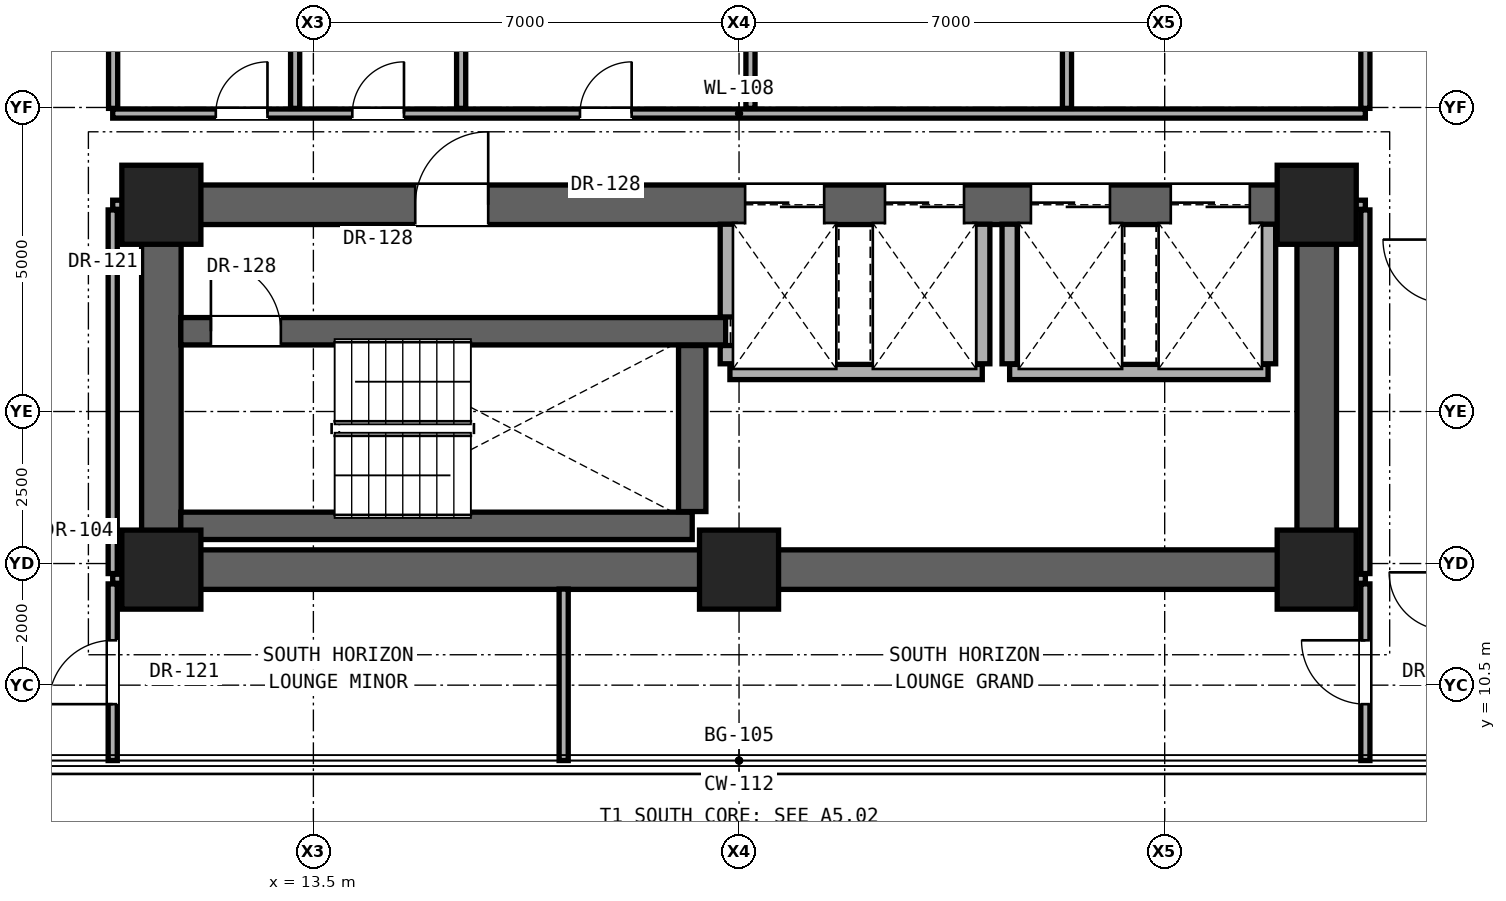
"""IFC4 building model, lengths in metres.
Left out: names, types, materials, properties, quantities, classifications, styles, units other than length and angle.
Written with IfcOpenShell. Run it as: python <this file> out.ifc"""

import sys

from ifc_helpers import new_model, si_unit, direction, frame, frame_2d, origin, origin_2d, place, context, subcontext, project, spatial, rectangle, extrude, element, fill, save


model = new_model("IFC4")
c1 = context("Model", 3, precision=1e-05, world=origin(), true_north=direction((0.0, 1.0)))
c2 = subcontext(c1, "Body", "Model", "MODEL_VIEW")
j1 = project(units=[si_unit("LENGTHUNIT", "METRE"), si_unit("PLANEANGLEUNIT", "RADIAN")], contexts=[c1])
p1 = place(None, origin())
s1 = spatial("IfcSite", under=j1, at=p1, CompositionType="ELEMENT")
p2 = place(p1, origin())
s2 = spatial("IfcBuilding", under=s1, at=p2, CompositionType="ELEMENT")
p3 = place(p2, frame((0.0, 0.0, 52.1)))
s3 = spatial("IfcBuildingStorey", under=s2, at=p3, CompositionType="ELEMENT", Elevation=52.1)
for number, where, z_axis, x_axis in (
    (1, (11.0, 12.4, 0.0), (0.0, 0.0, 1.0), (1.0, 0.0, 0.0)),
    (2, (20.5, 12.4, 0.0), (0.0, 0.0, 1.0), (1.0, 0.0, 0.0)),
    (3, (30.0, 12.4, 0.0), (0.0, 0.0, 1.0), (1.0, 0.0, 0.0)),
    (4, (11.0, 18.4, 0.0), (0.0, 0.0, 1.0), (1.0, 0.0, 0.0)),
    (5, (30.0, 18.4, 0.0), (0.0, 0.0, 1.0), (1.0, 0.0, 0.0)),
):
    element("IfcColumn", number, at=place(p3, frame(where, z_axis=z_axis, x_axis=x_axis)), inside=s3, PredefinedType="COLUMN", context=c2, shape_type="SweptSolid", body=[
        extrude(rectangle(XDim=1.3, YDim=1.3, at=origin_2d()), origin(), (0.0, 0.0, 1.0), 3.3),
    ])
p4 = place(p3, frame((11.0, 12.4, 0.0), z_axis=(0.0, 0.0, 1.0), x_axis=(1.0, 0.0, 0.0)))
e6 = element("IfcWall", 6, at=p4, inside=s3, PredefinedType="SHEAR", context=c2, shape_type="SweptSolid", body=[
    extrude(rectangle(XDim=19.0, YDim=0.65, at=frame_2d((9.5, 0.0))), origin(), (0.0, 0.0, 1.0), 3.06),
])
for number, where, z_axis, x_axis in (
    (7, (11.0, 12.4, 0.0), (0.0, 0.0, 1.0), (0.0, 1.0, 0.0)),
    (8, (30.0, 12.4, 0.0), (0.0, 0.0, 1.0), (0.0, 1.0, 0.0)),
):
    element("IfcWall", number, at=place(p3, frame(where, z_axis=z_axis, x_axis=x_axis)), inside=s3, PredefinedType="SHEAR", context=c2, shape_type="SweptSolid", body=[
        extrude(rectangle(XDim=6.0, YDim=0.65, at=frame_2d((3.0, 0.0))), origin(), (0.0, 0.0, 1.0), 3.06),
    ])
p5 = place(p3, frame((11.0, 18.4, 0.0), z_axis=(0.0, 0.0, 1.0), x_axis=(1.0, 0.0, 0.0)))
e9 = element("IfcWall", 9, at=p5, inside=s3, PredefinedType="SHEAR", context=c2, shape_type="SweptSolid", body=[
    extrude(rectangle(XDim=19.0, YDim=0.65, at=frame_2d((9.5, 0.0))), origin(), (0.0, 0.0, 1.0), 3.06),
])
p6 = place(p5, frame((4.175, 0.0, 0.0)))
e10 = element("IfcOpeningElement", 10, at=p6, cuts=e9, PredefinedType="OPENING", context=c2, shape_type="SweptSolid", body=[
    extrude(rectangle(XDim=1.2, YDim=2.25, at=frame_2d((0.6, 1.125))), frame((0.0, 0.335, 0.0), z_axis=(0.0, -1.0, 0.0), x_axis=(1.0, 0.0, 0.0)), (0.0, 0.0, 1.0), 0.67),
])
p7 = place(p5, frame((9.6, 0.0, 0.0)))
e11 = element("IfcOpeningElement", 11, at=p7, cuts=e9, PredefinedType="OPENING", context=c2, shape_type="SweptSolid", body=[
    extrude(rectangle(XDim=1.3, YDim=2.3, at=frame_2d((0.65, 1.15))), frame((0.0, 0.335, 0.0), z_axis=(0.0, -1.0, 0.0), x_axis=(1.0, 0.0, 0.0)), (0.0, 0.0, 1.0), 0.67),
])
p8 = place(p5, frame((11.9, 0.0, 0.0)))
e12 = element("IfcOpeningElement", 12, at=p8, cuts=e9, PredefinedType="OPENING", context=c2, shape_type="SweptSolid", body=[
    extrude(rectangle(XDim=1.3, YDim=2.3, at=frame_2d((0.65, 1.15))), frame((0.0, 0.335, 0.0), z_axis=(0.0, -1.0, 0.0), x_axis=(1.0, 0.0, 0.0)), (0.0, 0.0, 1.0), 0.67),
])
p9 = place(p5, frame((14.3, 0.0, 0.0)))
e13 = element("IfcOpeningElement", 13, at=p9, cuts=e9, PredefinedType="OPENING", context=c2, shape_type="SweptSolid", body=[
    extrude(rectangle(XDim=1.3, YDim=2.3, at=frame_2d((0.65, 1.15))), frame((0.0, 0.335, 0.0), z_axis=(0.0, -1.0, 0.0), x_axis=(1.0, 0.0, 0.0)), (0.0, 0.0, 1.0), 0.67),
])
p10 = place(p5, frame((16.6, 0.0, 0.0)))
e14 = element("IfcOpeningElement", 14, at=p10, cuts=e9, PredefinedType="OPENING", context=c2, shape_type="SweptSolid", body=[
    extrude(rectangle(XDim=1.3, YDim=2.3, at=frame_2d((0.65, 1.15))), frame((0.0, 0.335, 0.0), z_axis=(0.0, -1.0, 0.0), x_axis=(1.0, 0.0, 0.0)), (0.0, 0.0, 1.0), 0.67),
])
for number, where, z_axis, x_axis in (
    (15, (10.2, 12.25, 0.0), (0.0, 0.0, 1.0), (1.0, 0.0, 0.0)),
    (16, (30.32, 12.25, 0.0), (0.0, 0.0, 1.0), (1.0, 0.0, 0.0)),
):
    element("IfcWall", number, at=place(p3, frame(where, z_axis=z_axis, x_axis=x_axis)), inside=s3, PredefinedType="PARTITIONING", context=c2, shape_type="SweptSolid", body=[
        extrude(rectangle(XDim=0.48, YDim=0.15, at=frame_2d((0.24, 0.0))), origin(), (0.0, 0.0, 1.0), 3.06),
    ])
p11 = place(p3, frame((11.32, 13.12, 0.0), z_axis=(0.0, 0.0, 1.0), x_axis=(1.0, 0.0, 0.0)))
e17 = element("IfcWall", 17, at=p11, inside=s3, PredefinedType="SHEAR", context=c2, shape_type="SweptSolid", body=[
    extrude(rectangle(XDim=8.41, YDim=0.45, at=frame_2d((4.205, 0.0))), origin(), (0.0, 0.0, 1.0), 3.06),
])
p12 = place(p3, frame((20.35, 15.65, 0.0), z_axis=(0.0, 0.0, 1.0), x_axis=(1.0, 0.0, 0.0)))
e18 = element("IfcWall", 18, at=p12, inside=s3, PredefinedType="SOLIDWALL", context=c2, shape_type="SweptSolid", body=[
    extrude(rectangle(XDim=4.15, YDim=0.25, at=frame_2d((2.075, 0.0))), origin(), (0.0, 0.0, 1.0), 3.06),
])
p13 = place(p3, frame((24.95, 15.65, 0.0), z_axis=(0.0, 0.0, 1.0), x_axis=(1.0, 0.0, 0.0)))
e19 = element("IfcWall", 19, at=p13, inside=s3, PredefinedType="SOLIDWALL", context=c2, shape_type="SweptSolid", body=[
    extrude(rectangle(XDim=4.25, YDim=0.25, at=frame_2d((2.125, 0.0))), origin(), (0.0, 0.0, 1.0), 3.06),
])
p14 = place(p3, frame((11.32, 16.32, 0.0), z_axis=(0.0, 0.0, 1.0), x_axis=(1.0, 0.0, 0.0)))
e20 = element("IfcWall", 20, at=p14, inside=s3, PredefinedType="SHEAR", context=c2, shape_type="SweptSolid", body=[
    extrude(rectangle(XDim=8.96, YDim=0.45, at=frame_2d((4.48, 0.0))), origin(), (0.0, 0.0, 1.0), 3.06),
])
p15 = place(p14, frame((0.495, 0.0, 0.0)))
e21 = element("IfcOpeningElement", 21, at=p15, cuts=e20, PredefinedType="OPENING", context=c2, shape_type="SweptSolid", body=[
    extrude(rectangle(XDim=1.15, YDim=2.2, at=frame_2d((0.575, 1.1))), frame((0.0, 0.235, 0.0), z_axis=(0.0, -1.0, 0.0), x_axis=(1.0, 0.0, 0.0)), (0.0, 0.0, 1.0), 0.47),
])
for number, where, z_axis, x_axis in (
    (22, (10.2, 18.4, 0.0), (0.0, 0.0, 1.0), (1.0, 0.0, 0.0)),
    (23, (30.32, 18.4, 0.0), (0.0, 0.0, 1.0), (1.0, 0.0, 0.0)),
):
    element("IfcWall", number, at=place(p3, frame(where, z_axis=z_axis, x_axis=x_axis)), inside=s3, PredefinedType="PARTITIONING", context=c2, shape_type="SweptSolid", body=[
        extrude(rectangle(XDim=0.48, YDim=0.15, at=frame_2d((0.24, 0.0))), origin(), (0.0, 0.0, 1.0), 2.436),
    ])
p16 = place(p3, frame((10.2, 19.9, 0.0), z_axis=(0.0, 0.0, 1.0), x_axis=(1.0, 0.0, 0.0)))
e24 = element("IfcWall", 24, at=p16, inside=s3, PredefinedType="PARTITIONING", context=c2, shape_type="SweptSolid", body=[
    extrude(rectangle(XDim=20.6, YDim=0.15, at=frame_2d((10.3, 0.0))), origin(), (0.0, 0.0, 1.0), 2.104),
])
p17 = place(p16, frame((1.695, 0.0, 0.0)))
e25 = element("IfcOpeningElement", 25, at=p17, cuts=e24, PredefinedType="OPENING", context=c2, shape_type="SweptSolid", body=[
    extrude(rectangle(XDim=0.85, YDim=2.01, at=frame_2d((0.425, 1.005))), frame((0.0, 0.085, 0.0), z_axis=(0.0, -1.0, 0.0), x_axis=(1.0, 0.0, 0.0)), (0.0, 0.0, 1.0), 0.17),
])
p18 = place(p16, frame((3.94, 0.0, 0.0)))
e26 = element("IfcOpeningElement", 26, at=p18, cuts=e24, PredefinedType="OPENING", context=c2, shape_type="SweptSolid", body=[
    extrude(rectangle(XDim=0.85, YDim=2.01, at=frame_2d((0.425, 1.005))), frame((0.0, 0.085, 0.0), z_axis=(0.0, -1.0, 0.0), x_axis=(1.0, 0.0, 0.0)), (0.0, 0.0, 1.0), 0.17),
])
p19 = place(p16, frame((7.684, 0.0, 0.0)))
e27 = element("IfcOpeningElement", 27, at=p19, cuts=e24, PredefinedType="OPENING", context=c2, shape_type="SweptSolid", body=[
    extrude(rectangle(XDim=0.85, YDim=2.01, at=frame_2d((0.425, 1.005))), frame((0.0, 0.085, 0.0), z_axis=(0.0, -1.0, 0.0), x_axis=(1.0, 0.0, 0.0)), (0.0, 0.0, 1.0), 0.17),
])
p20 = place(p3, frame((10.2, 9.26, 0.0), z_axis=(0.0, 0.0, 1.0), x_axis=(0.0, 1.0, 0.0)))
e28 = element("IfcWall", 28, at=p20, inside=s3, PredefinedType="PARTITIONING", context=c2, shape_type="SweptSolid", body=[
    extrude(rectangle(XDim=2.905, YDim=0.15, at=frame_2d((1.453, 0.0))), origin(), (0.0, 0.0, 1.0), 3.06),
])
p21 = place(p20, frame((0.927, 0.0, 0.0)))
e29 = element("IfcOpeningElement", 29, at=p21, cuts=e28, PredefinedType="OPENING", context=c2, shape_type="SweptSolid", body=[
    extrude(rectangle(XDim=1.05, YDim=2.2, at=frame_2d((0.525, 1.1))), frame((0.0, 0.085, 0.0), z_axis=(0.0, -1.0, 0.0), x_axis=(1.0, 0.0, 0.0)), (0.0, 0.0, 1.0), 0.17),
])
p22 = place(p3, frame((10.2, 12.335, 0.0), z_axis=(0.0, 0.0, 1.0), x_axis=(0.0, 1.0, 0.0)))
e30 = element("IfcWall", 30, at=p22, inside=s3, PredefinedType="PARTITIONING", context=c2, shape_type="SweptSolid", body=[
    extrude(rectangle(XDim=5.98, YDim=0.15, at=frame_2d((2.99, 0.0))), origin(), (0.0, 0.0, 1.0), 2.436),
])
for number, where, z_axis, x_axis in (
    (31, (10.207, 19.985, 0.0), (0.0, 0.0, 1.0), (0.0, 1.0, 0.0)),
    (32, (13.2, 19.985, 0.0), (0.0, 0.0, 1.0), (0.0, 1.0, 0.0)),
):
    element("IfcWall", number, at=place(p3, frame(where, z_axis=z_axis, x_axis=x_axis)), inside=s3, PredefinedType="PARTITIONING", context=c2, shape_type="SweptSolid", body=[
        extrude(rectangle(XDim=2.78, YDim=0.15, at=frame_2d((1.39, 0.0))), origin(), (0.0, 0.0, 1.0), 3.06),
    ])
p23 = place(p3, frame((15.93, 19.985, 0.0), z_axis=(0.0, 0.0, 1.0), x_axis=(0.0, 1.0, 0.0)))
e33 = element("IfcWall", 33, at=p23, inside=s3, PredefinedType="PARTITIONING", context=c2, shape_type="SweptSolid", body=[
    extrude(rectangle(XDim=2.78, YDim=0.15, at=frame_2d((1.39, 0.0))), origin(), (0.0, 0.0, 1.0), 2.589),
])
p24 = place(p3, frame((17.616, 9.26, 0.0), z_axis=(0.0, 0.0, 1.0), x_axis=(0.0, 1.0, 0.0)))
e34 = element("IfcWall", 34, at=p24, inside=s3, PredefinedType="PARTITIONING", context=c2, shape_type="SweptSolid", body=[
    extrude(rectangle(XDim=2.82, YDim=0.15, at=frame_2d((1.41, 0.0))), origin(), (0.0, 0.0, 1.0), 3.06),
])
p25 = place(p3, frame((19.73, 13.355, 0.0), z_axis=(0.0, 0.0, 1.0), x_axis=(0.0, 1.0, 0.0)))
e35 = element("IfcWall", 35, at=p25, inside=s3, PredefinedType="SHEAR", context=c2, shape_type="SweptSolid", body=[
    extrude(rectangle(XDim=2.73, YDim=0.45, at=frame_2d((1.365, 0.0))), origin(), (0.0, 0.0, 1.0), 3.06),
])
p26 = place(p3, frame((20.315, 15.785, 0.0), z_axis=(0.0, 0.0, 1.0), x_axis=(0.0, 1.0, 0.0)))
e36 = element("IfcWall", 36, at=p26, inside=s3, PredefinedType="SOLIDWALL", context=c2, shape_type="SweptSolid", body=[
    extrude(rectangle(XDim=0.3, YDim=0.25, at=frame_2d((0.15, 0.0))), origin(), (0.0, 0.0, 1.0), 3.06),
])
p27 = place(p3, frame((20.315, 16.555, 0.0), z_axis=(0.0, 0.0, 1.0), x_axis=(0.0, 1.0, 0.0)))
e37 = element("IfcWall", 37, at=p27, inside=s3, PredefinedType="SOLIDWALL", context=c2, shape_type="SweptSolid", body=[
    extrude(rectangle(XDim=1.525, YDim=0.25, at=frame_2d((0.763, 0.0))), origin(), (0.0, 0.0, 1.0), 3.06),
])
p28 = place(p3, frame((20.688, 19.985, 0.0), z_axis=(0.0, 0.0, 1.0), x_axis=(0.0, 1.0, 0.0)))
e38 = element("IfcWall", 38, at=p28, inside=s3, PredefinedType="PARTITIONING", context=c2, shape_type="SweptSolid", body=[
    extrude(rectangle(XDim=13.03, YDim=0.15, at=frame_2d((6.515, 0.0))), origin(), (0.0, 0.0, 1.0), 2.104),
])
for number, where, z_axis, x_axis in (
    (39, (24.5, 15.785, 0.0), (0.0, 0.0, 1.0), (0.0, 1.0, 0.0)),
    (40, (24.95, 15.785, 0.0), (0.0, 0.0, 1.0), (0.0, 1.0, 0.0)),
):
    element("IfcWall", number, at=place(p3, frame(where, z_axis=z_axis, x_axis=x_axis)), inside=s3, PredefinedType="SOLIDWALL", context=c2, shape_type="SweptSolid", body=[
        extrude(rectangle(XDim=2.295, YDim=0.25, at=frame_2d((1.147, 0.0))), origin(), (0.0, 0.0, 1.0), 3.06),
    ])
p29 = place(p3, frame((25.893, 19.985, 0.0), z_axis=(0.0, 0.0, 1.0), x_axis=(0.0, 1.0, 0.0)))
e41 = element("IfcWall", 41, at=p29, inside=s3, PredefinedType="PARTITIONING", context=c2, shape_type="SweptSolid", body=[
    extrude(rectangle(XDim=13.03, YDim=0.15, at=frame_2d((6.515, 0.0))), origin(), (0.0, 0.0, 1.0), 2.104),
])
p30 = place(p3, frame((29.2, 15.785, 0.0), z_axis=(0.0, 0.0, 1.0), x_axis=(0.0, 1.0, 0.0)))
e42 = element("IfcWall", 42, at=p30, inside=s3, PredefinedType="SOLIDWALL", context=c2, shape_type="SweptSolid", body=[
    extrude(rectangle(XDim=2.295, YDim=0.25, at=frame_2d((1.147, 0.0))), origin(), (0.0, 0.0, 1.0), 3.06),
])
p31 = place(p3, frame((30.8, 9.26, 0.0), z_axis=(0.0, 0.0, 1.0), x_axis=(0.0, 1.0, 0.0)))
e43 = element("IfcWall", 43, at=p31, inside=s3, PredefinedType="PARTITIONING", context=c2, shape_type="SweptSolid", body=[
    extrude(rectangle(XDim=2.905, YDim=0.15, at=frame_2d((1.453, 0.0))), origin(), (0.0, 0.0, 1.0), 3.06),
])
p32 = place(p31, frame((0.927, 0.0, 0.0)))
e44 = element("IfcOpeningElement", 44, at=p32, cuts=e43, PredefinedType="OPENING", context=c2, shape_type="SweptSolid", body=[
    extrude(rectangle(XDim=1.05, YDim=2.2, at=frame_2d((0.525, 1.1))), frame((0.0, 0.085, 0.0), z_axis=(0.0, -1.0, 0.0), x_axis=(1.0, 0.0, 0.0)), (0.0, 0.0, 1.0), 0.17),
])
p33 = place(p3, frame((30.8, 12.335, 0.0), z_axis=(0.0, 0.0, 1.0), x_axis=(0.0, 1.0, 0.0)))
e45 = element("IfcWall", 45, at=p33, inside=s3, PredefinedType="PARTITIONING", context=c2, shape_type="SweptSolid", body=[
    extrude(rectangle(XDim=5.98, YDim=0.15, at=frame_2d((2.99, 0.0))), origin(), (0.0, 0.0, 1.0), 2.436),
])
p34 = place(p3, frame((30.8, 19.985, 0.0), z_axis=(0.0, 0.0, 1.0), x_axis=(0.0, 1.0, 0.0)))
e46 = element("IfcWall", 46, at=p34, inside=s3, PredefinedType="PARTITIONING", context=c2, shape_type="SweptSolid", body=[
    extrude(rectangle(XDim=13.03, YDim=0.15, at=frame_2d((6.515, 0.0))), origin(), (0.0, 0.0, 1.0), 2.279),
])
p35 = place(p6, origin())
e47 = element("IfcDoor", 47, at=p35, inside=s3, OperationType="SINGLE_SWING_RIGHT", PredefinedType="DOOR", context=c2, shape_type="SweptSolid", body=[
    extrude(rectangle(XDim=1.2, YDim=2.25, at=frame_2d((0.6, 1.125))), frame((0.0, 0.025, 0.0), z_axis=(0.0, -1.0, 0.0), x_axis=(1.0, 0.0, 0.0)), (0.0, 0.0, 1.0), 0.05),
])
fill(e10, e47)
p36 = place(p15, origin())
e48 = element("IfcDoor", 48, at=p36, inside=s3, OperationType="SINGLE_SWING_LEFT", PredefinedType="DOOR", context=c2, shape_type="SweptSolid", body=[
    extrude(rectangle(XDim=1.15, YDim=2.2, at=frame_2d((0.575, 1.1))), frame((0.0, 0.025, 0.0), z_axis=(0.0, -1.0, 0.0), x_axis=(1.0, 0.0, 0.0)), (0.0, 0.0, 1.0), 0.05),
])
fill(e21, e48)
p37 = place(p17, origin())
e49 = element("IfcDoor", 49, at=p37, inside=s3, OperationType="SINGLE_SWING_RIGHT", PredefinedType="DOOR", context=c2, shape_type="SweptSolid", body=[
    extrude(rectangle(XDim=0.85, YDim=2.01, at=frame_2d((0.425, 1.005))), frame((0.0, 0.025, 0.0), z_axis=(0.0, -1.0, 0.0), x_axis=(1.0, 0.0, 0.0)), (0.0, 0.0, 1.0), 0.05),
])
fill(e25, e49)
p38 = place(p18, origin())
e50 = element("IfcDoor", 50, at=p38, inside=s3, OperationType="SINGLE_SWING_RIGHT", PredefinedType="DOOR", context=c2, shape_type="SweptSolid", body=[
    extrude(rectangle(XDim=0.85, YDim=2.01, at=frame_2d((0.425, 1.005))), frame((0.0, 0.025, 0.0), z_axis=(0.0, -1.0, 0.0), x_axis=(1.0, 0.0, 0.0)), (0.0, 0.0, 1.0), 0.05),
])
fill(e26, e50)
p39 = place(p19, origin())
e51 = element("IfcDoor", 51, at=p39, inside=s3, OperationType="SINGLE_SWING_RIGHT", PredefinedType="DOOR", context=c2, shape_type="SweptSolid", body=[
    extrude(rectangle(XDim=0.85, YDim=2.01, at=frame_2d((0.425, 1.005))), frame((0.0, 0.025, 0.0), z_axis=(0.0, -1.0, 0.0), x_axis=(1.0, 0.0, 0.0)), (0.0, 0.0, 1.0), 0.05),
])
fill(e27, e51)
p40 = place(p21, origin())
e52 = element("IfcDoor", 52, at=p40, inside=s3, OperationType="SINGLE_SWING_LEFT", PredefinedType="DOOR", context=c2, shape_type="SweptSolid", body=[
    extrude(rectangle(XDim=1.05, YDim=2.2, at=frame_2d((0.525, 1.1))), frame((0.0, 0.025, 0.0), z_axis=(0.0, -1.0, 0.0), x_axis=(1.0, 0.0, 0.0)), (0.0, 0.0, 1.0), 0.05),
])
fill(e29, e52)
p41 = place(p32, origin())
e53 = element("IfcDoor", 53, at=p41, inside=s3, OperationType="SINGLE_SWING_RIGHT", PredefinedType="DOOR", context=c2, shape_type="SweptSolid", body=[
    extrude(rectangle(XDim=1.05, YDim=2.2, at=frame_2d((0.525, 1.1))), frame((0.0, 0.025, 0.0), z_axis=(0.0, -1.0, 0.0), x_axis=(1.0, 0.0, 0.0)), (0.0, 0.0, 1.0), 0.05),
])
fill(e44, e53)
p42 = place(p7, origin())
e54 = element("IfcDoor", 54, at=p42, inside=s3, OperationType="DOUBLE_DOOR_SLIDING", PredefinedType="DOOR", context=c2, shape_type="SweptSolid", body=[
    extrude(rectangle(XDim=1.3, YDim=2.3, at=frame_2d((0.65, 1.15))), frame((0.0, 0.025, 0.0), z_axis=(0.0, -1.0, 0.0), x_axis=(1.0, 0.0, 0.0)), (0.0, 0.0, 1.0), 0.05),
])
fill(e11, e54)
p43 = place(p8, origin())
e55 = element("IfcDoor", 55, at=p43, inside=s3, OperationType="DOUBLE_DOOR_SLIDING", PredefinedType="DOOR", context=c2, shape_type="SweptSolid", body=[
    extrude(rectangle(XDim=1.3, YDim=2.3, at=frame_2d((0.65, 1.15))), frame((0.0, 0.025, 0.0), z_axis=(0.0, -1.0, 0.0), x_axis=(1.0, 0.0, 0.0)), (0.0, 0.0, 1.0), 0.05),
])
fill(e12, e55)
p44 = place(p9, origin())
e56 = element("IfcDoor", 56, at=p44, inside=s3, OperationType="DOUBLE_DOOR_SLIDING", PredefinedType="DOOR", context=c2, shape_type="SweptSolid", body=[
    extrude(rectangle(XDim=1.3, YDim=2.3, at=frame_2d((0.65, 1.15))), frame((0.0, 0.025, 0.0), z_axis=(0.0, -1.0, 0.0), x_axis=(1.0, 0.0, 0.0)), (0.0, 0.0, 1.0), 0.05),
])
fill(e13, e56)
p45 = place(p10, origin())
e57 = element("IfcDoor", 57, at=p45, inside=s3, OperationType="DOUBLE_DOOR_SLIDING", PredefinedType="DOOR", context=c2, shape_type="SweptSolid", body=[
    extrude(rectangle(XDim=1.3, YDim=2.3, at=frame_2d((0.65, 1.15))), frame((0.0, 0.025, 0.0), z_axis=(0.0, -1.0, 0.0), x_axis=(1.0, 0.0, 0.0)), (0.0, 0.0, 1.0), 0.05),
])
fill(e14, e57)
save(model, sys.argv[1])
